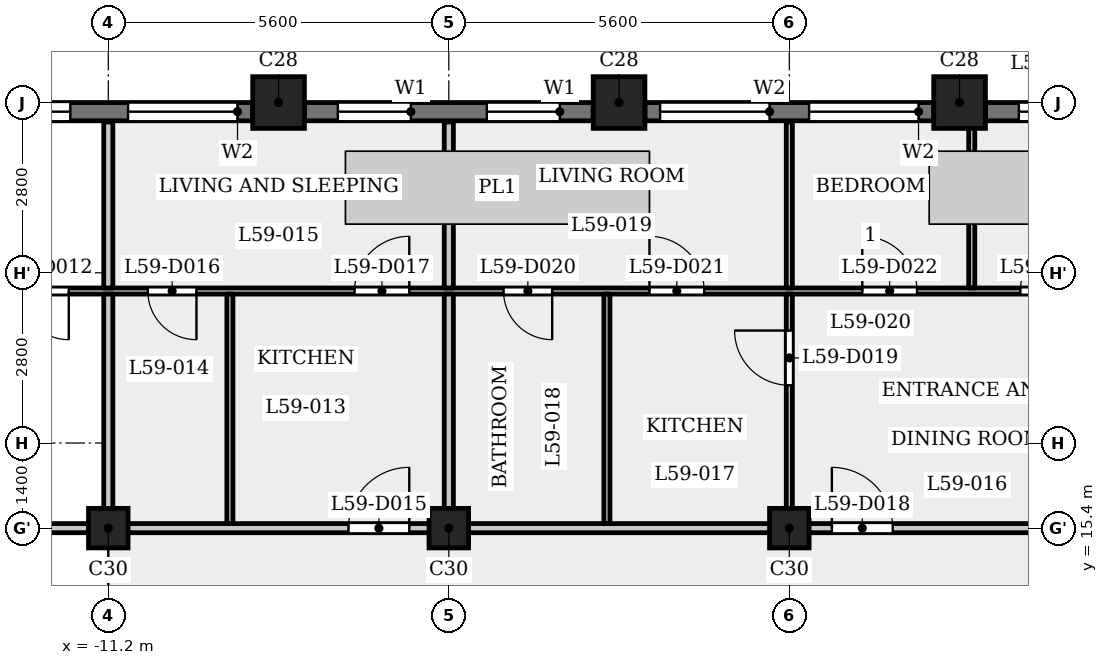
"""IFC4 building model, lengths in metres.
Left out: names, types, materials, properties, quantities, classifications, styles, units other than length and angle.
Written with IfcOpenShell. Run it as: python <this file> out.ifc"""

import sys

from ifc_helpers import new_model, si_unit, direction, frame, frame_2d, origin, origin_2d, place, context, subcontext, project, spatial, rectangle, extrude, element, fill, save


model = new_model("IFC4")
c1 = context("Model", 3, precision=1e-05, world=origin(), true_north=direction((0.0, 1.0)))
c2 = subcontext(c1, "Body", "Model", "MODEL_VIEW")
j1 = project(units=[si_unit("LENGTHUNIT", "METRE"), si_unit("PLANEANGLEUNIT", "RADIAN")], contexts=[c1])
p1 = place(None, origin())
s1 = spatial("IfcSite", under=j1, at=p1, CompositionType="ELEMENT")
p2 = place(p1, origin())
s2 = spatial("IfcBuilding", under=s1, at=p2, CompositionType="ELEMENT")
p3 = place(p2, frame((0.0, 0.0, 227.4)))
s3 = spatial("IfcBuildingStorey", under=s2, at=p3, CompositionType="ELEMENT", Elevation=227.4)
for number, where, z_axis, x_axis in (
    (1, (2.8, 22.4, 0.0), (0.0, 0.0, 1.0), (1.0, 0.0, 0.0)),
    (2, (-2.8, 22.4, 0.0), (0.0, 0.0, 1.0), (1.0, 0.0, 0.0)),
    (3, (-8.4, 22.4, 0.0), (0.0, 0.0, 1.0), (1.0, 0.0, 0.0)),
):
    element("IfcColumn", number, at=place(p3, frame(where, z_axis=z_axis, x_axis=x_axis)), inside=s3, PredefinedType="COLUMN", context=c2, shape_type="SweptSolid", body=[
        extrude(rectangle(XDim=0.85, YDim=0.85, at=origin_2d()), origin(), (0.0, 0.0, 1.0), 3.5),
    ])
for number, where, z_axis, x_axis in (
    (4, (-11.2, 15.4, 0.0), (0.0, 0.0, 1.0), (1.0, 0.0, 0.0)),
    (5, (-5.6, 15.4, 0.0), (0.0, 0.0, 1.0), (1.0, 0.0, 0.0)),
    (6, (0.0, 15.4, 0.0), (0.0, 0.0, 1.0), (1.0, 0.0, 0.0)),
):
    element("IfcColumn", number, at=place(p3, frame(where, z_axis=z_axis, x_axis=x_axis)), inside=s3, PredefinedType="COLUMN", context=c2, shape_type="SweptSolid", body=[
        extrude(rectangle(XDim=0.65, YDim=0.65, at=origin_2d()), origin(), (0.0, 0.0, 1.0), 3.5),
    ])
p4 = place(p3, frame((7.975, 22.25, 0.0), z_axis=(0.0, 0.0, 1.0), x_axis=(-1.0, 0.0, 0.0)))
e7 = element("IfcWall", 7, at=p4, inside=s3, PredefinedType="SOLIDWALL", context=c2, shape_type="SweptSolid", body=[
    extrude(rectangle(XDim=4.75, YDim=0.3, at=frame_2d((2.375, 0.0))), origin(), (0.0, 0.0, 1.0), 2.45),
])
p5 = place(p4, frame((0.25, 0.0, 0.9)))
e8 = element("IfcOpeningElement", 8, at=p5, cuts=e7, PredefinedType="OPENING", context=c2, shape_type="SweptSolid", body=[
    extrude(rectangle(XDim=1.8, YDim=1.25, at=frame_2d((0.9, 0.625))), frame((0.0, 0.16, 0.0), z_axis=(0.0, -1.0, 0.0), x_axis=(1.0, 0.0, 0.0)), (0.0, 0.0, 1.0), 0.32),
])
p6 = place(p4, frame((3.0, 0.0, 0.6)))
e9 = element("IfcOpeningElement", 9, at=p6, cuts=e7, PredefinedType="OPENING", context=c2, shape_type="SweptSolid", body=[
    extrude(rectangle(XDim=1.2, YDim=1.55, at=frame_2d((0.6, 0.775))), frame((0.0, 0.16, 0.0), z_axis=(0.0, -1.0, 0.0), x_axis=(1.0, 0.0, 0.0)), (0.0, 0.0, 1.0), 0.32),
])
p7 = place(p3, frame((2.375, 22.25, 0.0), z_axis=(0.0, 0.0, 1.0), x_axis=(-1.0, 0.0, 0.0)))
e10 = element("IfcWall", 10, at=p7, inside=s3, PredefinedType="SOLIDWALL", context=c2, shape_type="SweptSolid", body=[
    extrude(rectangle(XDim=4.75, YDim=0.3, at=frame_2d((2.375, 0.0))), origin(), (0.0, 0.0, 1.0), 2.45),
])
p8 = place(p7, frame((0.25, 0.0, 0.9)))
e11 = element("IfcOpeningElement", 11, at=p8, cuts=e10, PredefinedType="OPENING", context=c2, shape_type="SweptSolid", body=[
    extrude(rectangle(XDim=1.8, YDim=1.25, at=frame_2d((0.9, 0.625))), frame((0.0, 0.16, 0.0), z_axis=(0.0, -1.0, 0.0), x_axis=(1.0, 0.0, 0.0)), (0.0, 0.0, 1.0), 0.32),
])
p9 = place(p7, frame((2.7, 0.0, 0.9)))
e12 = element("IfcOpeningElement", 12, at=p9, cuts=e10, PredefinedType="OPENING", context=c2, shape_type="SweptSolid", body=[
    extrude(rectangle(XDim=1.8, YDim=1.25, at=frame_2d((0.9, 0.625))), frame((0.0, 0.16, 0.0), z_axis=(0.0, -1.0, 0.0), x_axis=(1.0, 0.0, 0.0)), (0.0, 0.0, 1.0), 0.32),
])
p10 = place(p3, frame((-3.225, 22.25, 0.0), z_axis=(0.0, 0.0, 1.0), x_axis=(-1.0, 0.0, 0.0)))
e13 = element("IfcWall", 13, at=p10, inside=s3, PredefinedType="SOLIDWALL", context=c2, shape_type="SweptSolid", body=[
    extrude(rectangle(XDim=4.75, YDim=0.3, at=frame_2d((2.375, 0.0))), origin(), (0.0, 0.0, 1.0), 2.45),
])
p11 = place(p10, frame((0.55, 0.0, 0.6)))
e14 = element("IfcOpeningElement", 14, at=p11, cuts=e13, PredefinedType="OPENING", context=c2, shape_type="SweptSolid", body=[
    extrude(rectangle(XDim=1.2, YDim=1.55, at=frame_2d((0.6, 0.775))), frame((0.0, 0.16, 0.0), z_axis=(0.0, -1.0, 0.0), x_axis=(1.0, 0.0, 0.0)), (0.0, 0.0, 1.0), 0.32),
])
p12 = place(p10, frame((3.0, 0.0, 0.6)))
e15 = element("IfcOpeningElement", 15, at=p12, cuts=e13, PredefinedType="OPENING", context=c2, shape_type="SweptSolid", body=[
    extrude(rectangle(XDim=1.2, YDim=1.55, at=frame_2d((0.6, 0.775))), frame((0.0, 0.16, 0.0), z_axis=(0.0, -1.0, 0.0), x_axis=(1.0, 0.0, 0.0)), (0.0, 0.0, 1.0), 0.32),
])
p13 = place(p3, frame((-8.825, 22.25, 0.0), z_axis=(0.0, 0.0, 1.0), x_axis=(-1.0, 0.0, 0.0)))
e16 = element("IfcWall", 16, at=p13, inside=s3, PredefinedType="SOLIDWALL", context=c2, shape_type="SweptSolid", body=[
    extrude(rectangle(XDim=4.75, YDim=0.3, at=frame_2d((2.375, 0.0))), origin(), (0.0, 0.0, 1.0), 2.45),
])
p14 = place(p13, frame((0.25, 0.0, 0.9)))
e17 = element("IfcOpeningElement", 17, at=p14, cuts=e16, PredefinedType="OPENING", context=c2, shape_type="SweptSolid", body=[
    extrude(rectangle(XDim=1.8, YDim=1.25, at=frame_2d((0.9, 0.625))), frame((0.0, 0.16, 0.0), z_axis=(0.0, -1.0, 0.0), x_axis=(1.0, 0.0, 0.0)), (0.0, 0.0, 1.0), 0.32),
])
p15 = place(p13, frame((3.0, 0.0, 0.6)))
e18 = element("IfcOpeningElement", 18, at=p15, cuts=e16, PredefinedType="OPENING", context=c2, shape_type="SweptSolid", body=[
    extrude(rectangle(XDim=1.2, YDim=1.55, at=frame_2d((0.6, 0.775))), frame((0.0, 0.16, 0.0), z_axis=(0.0, -1.0, 0.0), x_axis=(1.0, 0.0, 0.0)), (0.0, 0.0, 1.0), 0.32),
])
p16 = place(p3, frame((-24.684, 15.4, 0.0), z_axis=(0.0, 0.0, 1.0), x_axis=(1.0, 0.0, 0.0)))
e19 = element("IfcWall", 19, at=p16, inside=s3, PredefinedType="PARTITIONING", context=c2, shape_type="SweptSolid", body=[
    extrude(rectangle(XDim=49.368, YDim=0.15, at=frame_2d((24.684, 0.0))), origin(), (0.0, 0.0, 1.0), 3.15),
])
p17 = place(p16, frame((6.234, 0.0, 0.0)))
e20 = element("IfcOpeningElement", 20, at=p17, cuts=e19, PredefinedType="OPENING", context=c2, shape_type="SweptSolid", body=[
    extrude(rectangle(XDim=1.0, YDim=2.1, at=frame_2d((0.5, 1.05))), frame((0.0, 0.085, 0.0), z_axis=(0.0, -1.0, 0.0), x_axis=(1.0, 0.0, 0.0)), (0.0, 0.0, 1.0), 0.17),
])
p18 = place(p16, frame((17.434, 0.0, 0.0)))
e21 = element("IfcOpeningElement", 21, at=p18, cuts=e19, PredefinedType="OPENING", context=c2, shape_type="SweptSolid", body=[
    extrude(rectangle(XDim=1.0, YDim=2.1, at=frame_2d((0.5, 1.05))), frame((0.0, 0.085, 0.0), z_axis=(0.0, -1.0, 0.0), x_axis=(1.0, 0.0, 0.0)), (0.0, 0.0, 1.0), 0.17),
])
p19 = place(p16, frame((25.384, 0.0, 0.0)))
e22 = element("IfcOpeningElement", 22, at=p19, cuts=e19, PredefinedType="OPENING", context=c2, shape_type="SweptSolid", body=[
    extrude(rectangle(XDim=1.0, YDim=2.1, at=frame_2d((0.5, 1.05))), frame((0.0, 0.085, 0.0), z_axis=(0.0, -1.0, 0.0), x_axis=(1.0, 0.0, 0.0)), (0.0, 0.0, 1.0), 0.17),
])
p20 = place(p16, frame((33.484, 0.0, 0.0)))
e23 = element("IfcOpeningElement", 23, at=p20, cuts=e19, PredefinedType="OPENING", context=c2, shape_type="SweptSolid", body=[
    extrude(rectangle(XDim=1.0, YDim=2.1, at=frame_2d((0.5, 1.05))), frame((0.0, 0.085, 0.0), z_axis=(0.0, -1.0, 0.0), x_axis=(1.0, 0.0, 0.0)), (0.0, 0.0, 1.0), 0.17),
])
p21 = place(p16, frame((47.225, 0.0, 0.0)))
e24 = element("IfcOpeningElement", 24, at=p21, cuts=e19, PredefinedType="OPENING", context=c2, shape_type="SweptSolid", body=[
    extrude(rectangle(XDim=1.0, YDim=2.1, at=frame_2d((0.5, 1.05))), frame((0.0, 0.085, 0.0), z_axis=(0.0, -1.0, 0.0), x_axis=(1.0, 0.0, 0.0)), (0.0, 0.0, 1.0), 0.17),
])
p22 = place(p3, frame((-22.256, 19.3, 0.0), z_axis=(0.0, 0.0, 1.0), x_axis=(1.0, 0.0, 0.0)))
e25 = element("IfcWall", 25, at=p22, inside=s3, PredefinedType="PARTITIONING", context=c2, shape_type="SweptSolid", body=[
    extrude(rectangle(XDim=44.511, YDim=0.1, at=frame_2d((22.256, 0.0))), origin(), (0.0, 0.0, 1.0), 3.15),
])
p23 = place(p22, frame((9.606, 0.0, 0.0)))
e26 = element("IfcOpeningElement", 26, at=p23, cuts=e25, PredefinedType="OPENING", context=c2, shape_type="SweptSolid", body=[
    extrude(rectangle(XDim=0.8, YDim=2.1, at=frame_2d((0.4, 1.05))), frame((0.0, 0.06, 0.0), z_axis=(0.0, -1.0, 0.0), x_axis=(1.0, 0.0, 0.0)), (0.0, 0.0, 1.0), 0.12),
])
p24 = place(p22, frame((3.906, 0.0, 0.0)))
e27 = element("IfcOpeningElement", 27, at=p24, cuts=e25, PredefinedType="OPENING", context=c2, shape_type="SweptSolid", body=[
    extrude(rectangle(XDim=0.9, YDim=2.1, at=frame_2d((0.45, 1.05))), frame((0.0, 0.06, 0.0), z_axis=(0.0, -1.0, 0.0), x_axis=(1.0, 0.0, 0.0)), (0.0, 0.0, 1.0), 0.12),
])
p25 = place(p22, frame((11.706, 0.0, 0.0)))
e28 = element("IfcOpeningElement", 28, at=p25, cuts=e25, PredefinedType="OPENING", context=c2, shape_type="SweptSolid", body=[
    extrude(rectangle(XDim=0.8, YDim=2.1, at=frame_2d((0.4, 1.05))), frame((0.0, 0.06, 0.0), z_axis=(0.0, -1.0, 0.0), x_axis=(1.0, 0.0, 0.0)), (0.0, 0.0, 1.0), 0.12),
])
p26 = place(p22, frame((15.106, 0.0, 0.0)))
e29 = element("IfcOpeningElement", 29, at=p26, cuts=e25, PredefinedType="OPENING", context=c2, shape_type="SweptSolid", body=[
    extrude(rectangle(XDim=0.9, YDim=2.1, at=frame_2d((0.45, 1.05))), frame((0.0, 0.06, 0.0), z_axis=(0.0, -1.0, 0.0), x_axis=(1.0, 0.0, 0.0)), (0.0, 0.0, 1.0), 0.12),
])
p27 = place(p22, frame((17.556, 0.0, 0.0)))
e30 = element("IfcOpeningElement", 30, at=p27, cuts=e25, PredefinedType="OPENING", context=c2, shape_type="SweptSolid", body=[
    extrude(rectangle(XDim=0.8, YDim=2.1, at=frame_2d((0.4, 1.05))), frame((0.0, 0.06, 0.0), z_axis=(0.0, -1.0, 0.0), x_axis=(1.0, 0.0, 0.0)), (0.0, 0.0, 1.0), 0.12),
])
p28 = place(p22, frame((19.956, 0.0, 0.0)))
e31 = element("IfcOpeningElement", 31, at=p28, cuts=e25, PredefinedType="OPENING", context=c2, shape_type="SweptSolid", body=[
    extrude(rectangle(XDim=0.9, YDim=2.1, at=frame_2d((0.45, 1.05))), frame((0.0, 0.06, 0.0), z_axis=(0.0, -1.0, 0.0), x_axis=(1.0, 0.0, 0.0)), (0.0, 0.0, 1.0), 0.12),
])
p29 = place(p22, frame((23.456, 0.0, 0.0)))
e32 = element("IfcOpeningElement", 32, at=p29, cuts=e25, PredefinedType="OPENING", context=c2, shape_type="SweptSolid", body=[
    extrude(rectangle(XDim=0.9, YDim=2.1, at=frame_2d((0.45, 1.05))), frame((0.0, 0.06, 0.0), z_axis=(0.0, -1.0, 0.0), x_axis=(1.0, 0.0, 0.0)), (0.0, 0.0, 1.0), 0.12),
])
p30 = place(p22, frame((26.056, 0.0, 0.0)))
e33 = element("IfcOpeningElement", 33, at=p30, cuts=e25, PredefinedType="OPENING", context=c2, shape_type="SweptSolid", body=[
    extrude(rectangle(XDim=0.9, YDim=2.1, at=frame_2d((0.45, 1.05))), frame((0.0, 0.06, 0.0), z_axis=(0.0, -1.0, 0.0), x_axis=(1.0, 0.0, 0.0)), (0.0, 0.0, 1.0), 0.12),
])
p31 = place(p22, frame((28.756, 0.0, 0.0)))
e34 = element("IfcOpeningElement", 34, at=p31, cuts=e25, PredefinedType="OPENING", context=c2, shape_type="SweptSolid", body=[
    extrude(rectangle(XDim=0.8, YDim=2.1, at=frame_2d((0.4, 1.05))), frame((0.0, 0.06, 0.0), z_axis=(0.0, -1.0, 0.0), x_axis=(1.0, 0.0, 0.0)), (0.0, 0.0, 1.0), 0.12),
])
p32 = place(p22, frame((31.156, 0.0, 0.0)))
e35 = element("IfcOpeningElement", 35, at=p32, cuts=e25, PredefinedType="OPENING", context=c2, shape_type="SweptSolid", body=[
    extrude(rectangle(XDim=0.9, YDim=2.1, at=frame_2d((0.45, 1.05))), frame((0.0, 0.06, 0.0), z_axis=(0.0, -1.0, 0.0), x_axis=(1.0, 0.0, 0.0)), (0.0, 0.0, 1.0), 0.12),
])
p33 = place(p22, frame((37.606, 0.0, 0.0)))
e36 = element("IfcOpeningElement", 36, at=p33, cuts=e25, PredefinedType="OPENING", context=c2, shape_type="SweptSolid", body=[
    extrude(rectangle(XDim=0.8, YDim=2.1, at=frame_2d((0.4, 1.05))), frame((0.0, 0.06, 0.0), z_axis=(0.0, -1.0, 0.0), x_axis=(1.0, 0.0, 0.0)), (0.0, 0.0, 1.0), 0.12),
])
p34 = place(p22, frame((42.028, 0.0, 0.0)))
e37 = element("IfcOpeningElement", 37, at=p34, cuts=e25, PredefinedType="OPENING", context=c2, shape_type="SweptSolid", body=[
    extrude(rectangle(XDim=0.9, YDim=2.1, at=frame_2d((0.45, 1.05))), frame((0.0, 0.06, 0.0), z_axis=(0.0, -1.0, 0.0), x_axis=(1.0, 0.0, 0.0)), (0.0, 0.0, 1.0), 0.12),
])
p35 = place(p3, frame((-11.2, 15.475, 0.0), z_axis=(0.0, 0.0, 1.0), x_axis=(0.0, 1.0, 0.0)))
e38 = element("IfcWall", 38, at=p35, inside=s3, PredefinedType="PARTITIONING", context=c2, shape_type="SweptSolid", body=[
    extrude(rectangle(XDim=3.775, YDim=0.15, at=frame_2d((1.887, 0.0))), origin(), (0.0, 0.0, 1.0), 3.15),
])
p36 = place(p3, frame((-11.2, 19.35, 0.0), z_axis=(0.0, 0.0, 1.0), x_axis=(0.0, 1.0, 0.0)))
e39 = element("IfcWall", 39, at=p36, inside=s3, PredefinedType="PARTITIONING", context=c2, shape_type="SweptSolid", body=[
    extrude(rectangle(XDim=2.73, YDim=0.15, at=frame_2d((1.365, 0.0))), origin(), (0.0, 0.0, 1.0), 3.15),
])
p37 = place(p3, frame((-9.2, 15.475, 0.0), z_axis=(0.0, 0.0, 1.0), x_axis=(0.0, 1.0, 0.0)))
e40 = element("IfcWall", 40, at=p37, inside=s3, PredefinedType="PARTITIONING", context=c2, shape_type="SweptSolid", body=[
    extrude(rectangle(XDim=3.775, YDim=0.1, at=frame_2d((1.887, 0.0))), origin(), (0.0, 0.0, 1.0), 3.15),
])
p38 = place(p3, frame((-5.6, 15.475, 0.0), z_axis=(0.0, 0.0, 1.0), x_axis=(0.0, 1.0, 0.0)))
e41 = element("IfcWall", 41, at=p38, inside=s3, PredefinedType="PARTITIONING", context=c2, shape_type="SweptSolid", body=[
    extrude(rectangle(XDim=3.775, YDim=0.15, at=frame_2d((1.887, 0.0))), origin(), (0.0, 0.0, 1.0), 3.15),
])
p39 = place(p3, frame((-5.6, 19.35, 0.0), z_axis=(0.0, 0.0, 1.0), x_axis=(0.0, 1.0, 0.0)))
e42 = element("IfcWall", 42, at=p39, inside=s3, PredefinedType="PARTITIONING", context=c2, shape_type="SweptSolid", body=[
    extrude(rectangle(XDim=2.73, YDim=0.15, at=frame_2d((1.365, 0.0))), origin(), (0.0, 0.0, 1.0), 3.15),
])
p40 = place(p3, frame((-3.0, 15.475, 0.0), z_axis=(0.0, 0.0, 1.0), x_axis=(0.0, 1.0, 0.0)))
e43 = element("IfcWall", 43, at=p40, inside=s3, PredefinedType="PARTITIONING", context=c2, shape_type="SweptSolid", body=[
    extrude(rectangle(XDim=3.775, YDim=0.1, at=frame_2d((1.887, 0.0))), origin(), (0.0, 0.0, 1.0), 3.15),
])
p41 = place(p3, frame((0.0, 15.475, 0.0), z_axis=(0.0, 0.0, 1.0), x_axis=(0.0, 1.0, 0.0)))
e44 = element("IfcWall", 44, at=p41, inside=s3, PredefinedType="PARTITIONING", context=c2, shape_type="SweptSolid", body=[
    extrude(rectangle(XDim=3.775, YDim=0.1, at=frame_2d((1.887, 0.0))), origin(), (0.0, 0.0, 1.0), 3.15),
])
p42 = place(p41, frame((2.275, 0.0, 0.0)))
e45 = element("IfcOpeningElement", 45, at=p42, cuts=e44, PredefinedType="OPENING", context=c2, shape_type="SweptSolid", body=[
    extrude(rectangle(XDim=0.9, YDim=2.1, at=frame_2d((0.45, 1.05))), frame((0.0, 0.06, 0.0), z_axis=(0.0, -1.0, 0.0), x_axis=(1.0, 0.0, 0.0)), (0.0, 0.0, 1.0), 0.12),
])
p43 = place(p3, frame((0.0, 19.35, 0.0), z_axis=(0.0, 0.0, 1.0), x_axis=(0.0, 1.0, 0.0)))
e46 = element("IfcWall", 46, at=p43, inside=s3, PredefinedType="PARTITIONING", context=c2, shape_type="SweptSolid", body=[
    extrude(rectangle(XDim=2.73, YDim=0.1, at=frame_2d((1.365, 0.0))), origin(), (0.0, 0.0, 1.0), 3.15),
])
p44 = place(p3, frame((3.0, 19.35, 0.0), z_axis=(0.0, 0.0, 1.0), x_axis=(0.0, 1.0, 0.0)))
e47 = element("IfcWall", 47, at=p44, inside=s3, PredefinedType="PARTITIONING", context=c2, shape_type="SweptSolid", body=[
    extrude(rectangle(XDim=3.455, YDim=0.1, at=frame_2d((1.728, 0.0))), origin(), (0.0, 0.0, 1.0), 3.15),
])
p45 = place(p23, origin())
e48 = element("IfcDoor", 48, at=p45, inside=s3, OperationType="SINGLE_SWING_RIGHT", PredefinedType="DOOR", context=c2, shape_type="SweptSolid", body=[
    extrude(rectangle(XDim=0.8, YDim=2.1, at=frame_2d((0.4, 1.05))), frame((0.0, 0.025, 0.0), z_axis=(0.0, -1.0, 0.0), x_axis=(1.0, 0.0, 0.0)), (0.0, 0.0, 1.0), 0.05),
])
fill(e26, e48)
p46 = place(p18, origin())
e49 = element("IfcDoor", 49, at=p46, inside=s3, OperationType="SINGLE_SWING_LEFT", PredefinedType="DOOR", context=c2, shape_type="SweptSolid", body=[
    extrude(rectangle(XDim=1.0, YDim=2.1, at=frame_2d((0.5, 1.05))), frame((0.0, 0.025, 0.0), z_axis=(0.0, -1.0, 0.0), x_axis=(1.0, 0.0, 0.0)), (0.0, 0.0, 1.0), 0.05),
])
fill(e21, e49)
p47 = place(p25, origin())
e50 = element("IfcDoor", 50, at=p47, inside=s3, OperationType="SINGLE_SWING_RIGHT", PredefinedType="DOOR", context=c2, shape_type="SweptSolid", body=[
    extrude(rectangle(XDim=0.8, YDim=2.1, at=frame_2d((0.4, 1.05))), frame((0.0, 0.025, 0.0), z_axis=(0.0, -1.0, 0.0), x_axis=(1.0, 0.0, 0.0)), (0.0, 0.0, 1.0), 0.05),
])
fill(e28, e50)
p48 = place(p26, origin())
e51 = element("IfcDoor", 51, at=p48, inside=s3, OperationType="SINGLE_SWING_LEFT", PredefinedType="DOOR", context=c2, shape_type="SweptSolid", body=[
    extrude(rectangle(XDim=0.9, YDim=2.1, at=frame_2d((0.45, 1.05))), frame((0.0, 0.025, 0.0), z_axis=(0.0, -1.0, 0.0), x_axis=(1.0, 0.0, 0.0)), (0.0, 0.0, 1.0), 0.05),
])
fill(e29, e51)
p49 = place(p19, origin())
e52 = element("IfcDoor", 52, at=p49, inside=s3, OperationType="SINGLE_SWING_RIGHT", PredefinedType="DOOR", context=c2, shape_type="SweptSolid", body=[
    extrude(rectangle(XDim=1.0, YDim=2.1, at=frame_2d((0.5, 1.05))), frame((0.0, 0.025, 0.0), z_axis=(0.0, -1.0, 0.0), x_axis=(1.0, 0.0, 0.0)), (0.0, 0.0, 1.0), 0.05),
])
fill(e22, e52)
p50 = place(p42, origin())
e53 = element("IfcDoor", 53, at=p50, inside=s3, OperationType="SINGLE_SWING_LEFT", PredefinedType="DOOR", context=c2, shape_type="SweptSolid", body=[
    extrude(rectangle(XDim=0.9, YDim=2.1, at=frame_2d((0.45, 1.05))), frame((0.0, 0.025, 0.0), z_axis=(0.0, -1.0, 0.0), x_axis=(1.0, 0.0, 0.0)), (0.0, 0.0, 1.0), 0.05),
])
fill(e45, e53)
p51 = place(p27, origin())
e54 = element("IfcDoor", 54, at=p51, inside=s3, OperationType="SINGLE_SWING_RIGHT", PredefinedType="DOOR", context=c2, shape_type="SweptSolid", body=[
    extrude(rectangle(XDim=0.8, YDim=2.1, at=frame_2d((0.4, 1.05))), frame((0.0, 0.025, 0.0), z_axis=(0.0, -1.0, 0.0), x_axis=(1.0, 0.0, 0.0)), (0.0, 0.0, 1.0), 0.05),
])
fill(e30, e54)
p52 = place(p28, origin())
e55 = element("IfcDoor", 55, at=p52, inside=s3, OperationType="SINGLE_SWING_RIGHT", PredefinedType="DOOR", context=c2, shape_type="SweptSolid", body=[
    extrude(rectangle(XDim=0.9, YDim=2.1, at=frame_2d((0.45, 1.05))), frame((0.0, 0.025, 0.0), z_axis=(0.0, -1.0, 0.0), x_axis=(1.0, 0.0, 0.0)), (0.0, 0.0, 1.0), 0.05),
])
fill(e31, e55)
p53 = place(p29, origin())
e56 = element("IfcDoor", 56, at=p53, inside=s3, OperationType="SINGLE_SWING_RIGHT", PredefinedType="DOOR", context=c2, shape_type="SweptSolid", body=[
    extrude(rectangle(XDim=0.9, YDim=2.1, at=frame_2d((0.45, 1.05))), frame((0.0, 0.025, 0.0), z_axis=(0.0, -1.0, 0.0), x_axis=(1.0, 0.0, 0.0)), (0.0, 0.0, 1.0), 0.05),
])
fill(e32, e56)
p54 = place(p30, origin())
e57 = element("IfcDoor", 57, at=p54, inside=s3, OperationType="SINGLE_SWING_LEFT", PredefinedType="DOOR", context=c2, shape_type="SweptSolid", body=[
    extrude(rectangle(XDim=0.9, YDim=2.1, at=frame_2d((0.45, 1.05))), frame((0.0, 0.025, 0.0), z_axis=(0.0, -1.0, 0.0), x_axis=(1.0, 0.0, 0.0)), (0.0, 0.0, 1.0), 0.05),
])
fill(e33, e57)
p55 = place(p6, origin())
e58 = element("IfcWindow", 58, at=p55, inside=s3, PartitioningType="SINGLE_PANEL", PredefinedType="WINDOW", context=c2, shape_type="SweptSolid", body=[
    extrude(rectangle(XDim=1.2, YDim=1.55, at=frame_2d((0.6, 0.775))), frame((0.0, 0.03, 0.0), z_axis=(0.0, -1.0, 0.0), x_axis=(1.0, 0.0, 0.0)), (0.0, 0.0, 1.0), 0.06),
])
fill(e9, e58)
p56 = place(p8, origin())
e59 = element("IfcWindow", 59, at=p56, inside=s3, PartitioningType="SINGLE_PANEL", PredefinedType="WINDOW", context=c2, shape_type="SweptSolid", body=[
    extrude(rectangle(XDim=1.8, YDim=1.25, at=frame_2d((0.9, 0.625))), frame((0.0, 0.03, 0.0), z_axis=(0.0, -1.0, 0.0), x_axis=(1.0, 0.0, 0.0)), (0.0, 0.0, 1.0), 0.06),
])
fill(e11, e59)
p57 = place(p9, origin())
e60 = element("IfcWindow", 60, at=p57, inside=s3, PartitioningType="SINGLE_PANEL", PredefinedType="WINDOW", context=c2, shape_type="SweptSolid", body=[
    extrude(rectangle(XDim=1.8, YDim=1.25, at=frame_2d((0.9, 0.625))), frame((0.0, 0.03, 0.0), z_axis=(0.0, -1.0, 0.0), x_axis=(1.0, 0.0, 0.0)), (0.0, 0.0, 1.0), 0.06),
])
fill(e12, e60)
p58 = place(p11, origin())
e61 = element("IfcWindow", 61, at=p58, inside=s3, PartitioningType="SINGLE_PANEL", PredefinedType="WINDOW", context=c2, shape_type="SweptSolid", body=[
    extrude(rectangle(XDim=1.2, YDim=1.55, at=frame_2d((0.6, 0.775))), frame((0.0, 0.03, 0.0), z_axis=(0.0, -1.0, 0.0), x_axis=(1.0, 0.0, 0.0)), (0.0, 0.0, 1.0), 0.06),
])
fill(e14, e61)
p59 = place(p12, origin())
e62 = element("IfcWindow", 62, at=p59, inside=s3, PartitioningType="SINGLE_PANEL", PredefinedType="WINDOW", context=c2, shape_type="SweptSolid", body=[
    extrude(rectangle(XDim=1.2, YDim=1.55, at=frame_2d((0.6, 0.775))), frame((0.0, 0.03, 0.0), z_axis=(0.0, -1.0, 0.0), x_axis=(1.0, 0.0, 0.0)), (0.0, 0.0, 1.0), 0.06),
])
fill(e15, e62)
p60 = place(p14, origin())
e63 = element("IfcWindow", 63, at=p60, inside=s3, PartitioningType="SINGLE_PANEL", PredefinedType="WINDOW", context=c2, shape_type="SweptSolid", body=[
    extrude(rectangle(XDim=1.8, YDim=1.25, at=frame_2d((0.9, 0.625))), frame((0.0, 0.03, 0.0), z_axis=(0.0, -1.0, 0.0), x_axis=(1.0, 0.0, 0.0)), (0.0, 0.0, 1.0), 0.06),
])
fill(e17, e63)
p61 = place(p15, origin())
e64 = element("IfcWindow", 64, at=p61, inside=s3, PartitioningType="SINGLE_PANEL", PredefinedType="WINDOW", context=c2, shape_type="SweptSolid", body=[
    extrude(rectangle(XDim=1.2, YDim=1.55, at=frame_2d((0.6, 0.775))), frame((0.0, 0.03, 0.0), z_axis=(0.0, -1.0, 0.0), x_axis=(1.0, 0.0, 0.0)), (0.0, 0.0, 1.0), 0.06),
])
fill(e18, e64)
save(model, sys.argv[1])
